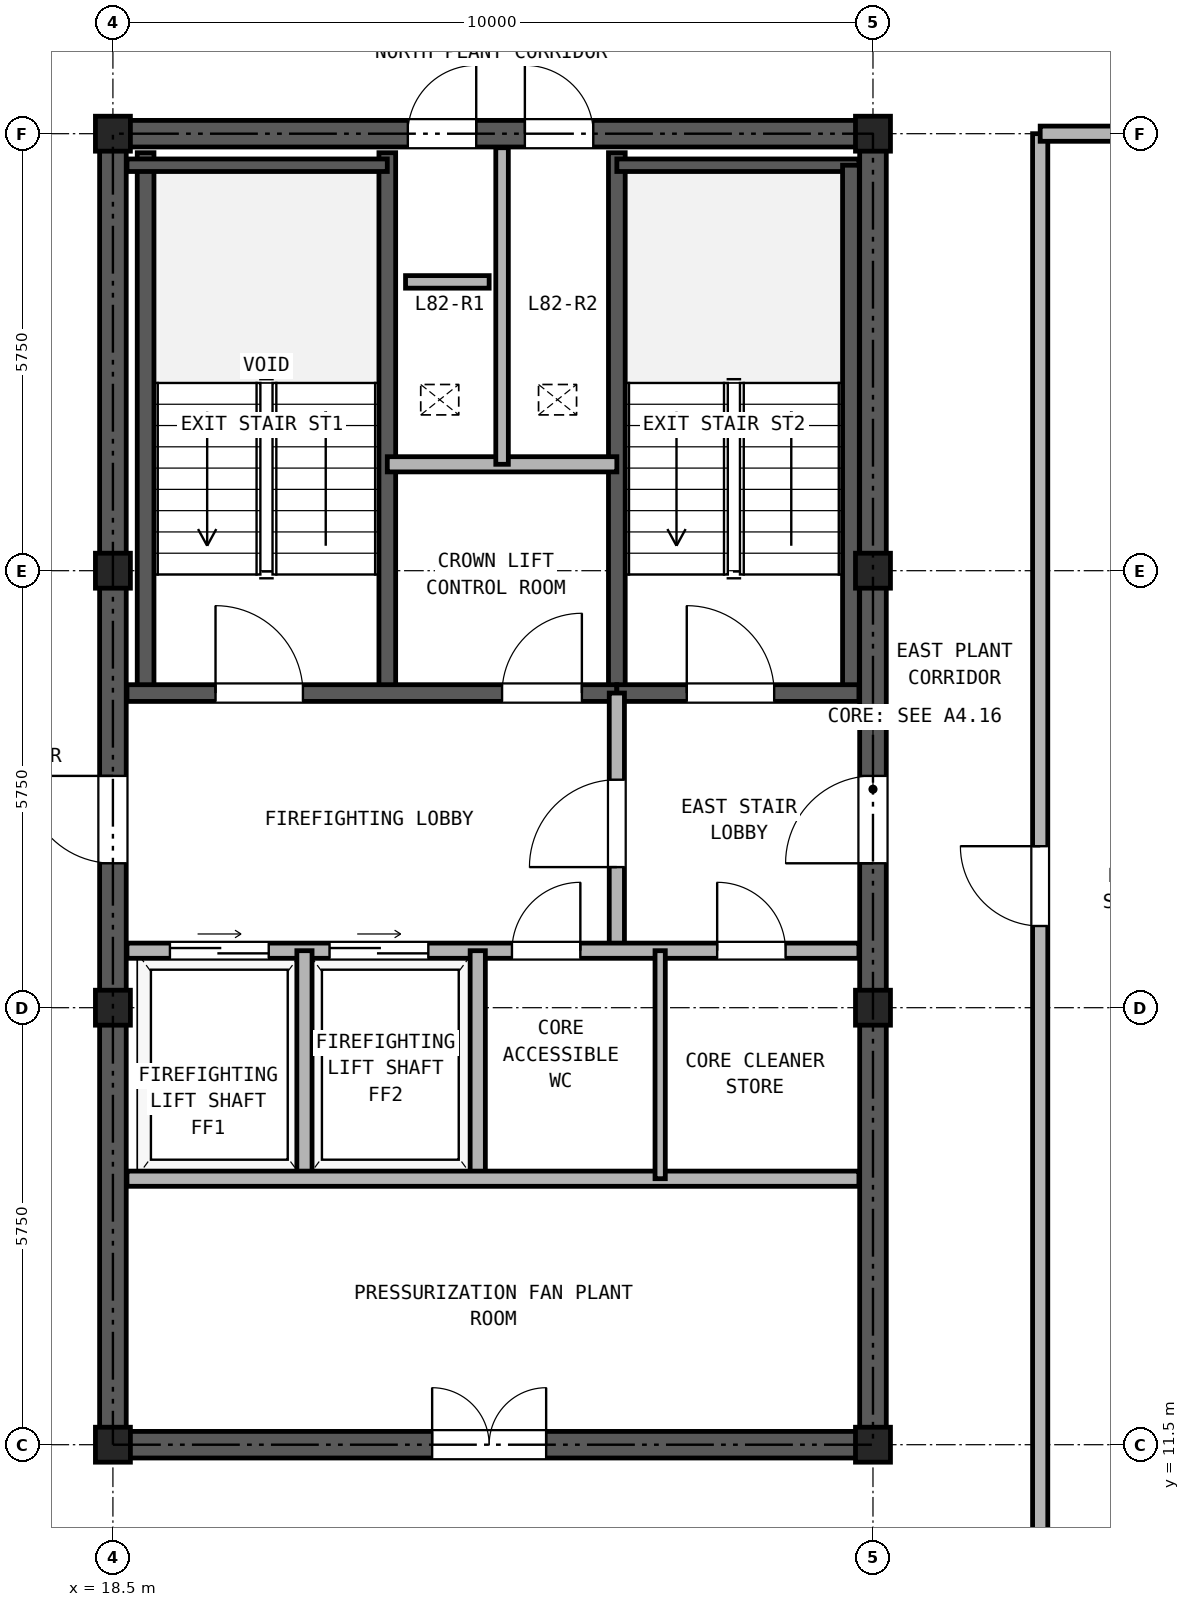
"""IFC4 building model, lengths in metres.
Left out: names, types, materials, properties, quantities, classifications, styles, units other than length and angle.
Written with IfcOpenShell. Run it as: python <this file> out.ifc"""

import sys

from ifc_helpers import new_model, si_unit, direction, frame, frame_2d, origin, origin_2d, place, context, subcontext, project, spatial, rectangle, hollow_rectangle, extrude, source, transform, mapped, element, fill, save


model = new_model("IFC4")
c1 = context("Model", 3, precision=1e-05, world=origin(), true_north=direction((0.0, 1.0)))
c2 = subcontext(c1, "Body", "Model", "MODEL_VIEW")
j1 = project(units=[si_unit("LENGTHUNIT", "METRE"), si_unit("PLANEANGLEUNIT", "RADIAN")], contexts=[c1])
p1 = place(None, origin())
s1 = spatial("IfcSite", under=j1, at=p1, CompositionType="ELEMENT")
p2 = place(p1, origin())
s2 = spatial("IfcBuilding", under=s1, at=p2, CompositionType="ELEMENT")
p3 = place(p2, frame((0.0, 0.0, 285.7)))
s3 = spatial("IfcBuildingStorey", under=s2, at=p3, CompositionType="ELEMENT", Elevation=285.7)
m1 = source(origin(), c2, "Body", "SweptSolid", [
    extrude(hollow_rectangle(XDim=0.46, YDim=0.46, WallThickness=0.025, at=origin_2d()), origin(), (0.0, 0.0, 1.0), 3.38),
])
for number, where, z_axis, x_axis in (
    (1, (18.5, 11.5, 0.0), (0.0, 0.0, 1.0), (1.0, 0.0, 0.0)),
    (2, (18.5, 17.25, 0.0), (0.0, 0.0, 1.0), (1.0, 0.0, 0.0)),
    (3, (18.5, 23.0, 0.0), (0.0, 0.0, 1.0), (1.0, 0.0, 0.0)),
    (4, (18.5, 28.75, 0.0), (0.0, 0.0, 1.0), (1.0, 0.0, 0.0)),
    (5, (28.5, 11.5, 0.0), (0.0, 0.0, 1.0), (1.0, 0.0, 0.0)),
    (6, (28.5, 17.25, 0.0), (0.0, 0.0, 1.0), (1.0, 0.0, 0.0)),
    (7, (28.5, 23.0, 0.0), (0.0, 0.0, 1.0), (1.0, 0.0, 0.0)),
    (8, (28.5, 28.75, 0.0), (0.0, 0.0, 1.0), (1.0, 0.0, 0.0)),
):
    element("IfcColumn", number, at=place(p3, frame(where, z_axis=z_axis, x_axis=x_axis)), inside=s3, PredefinedType="COLUMN", context=c2, shape_type="MappedRepresentation", body=[
        mapped(m1, transform((0.0, 0.0, 0.0), x_axis=(1.0, 0.0, 0.0), y_axis=(0.0, 1.0, 0.0), z_axis=(0.0, 0.0, 1.0), scale=1.0)),
    ])
p4 = place(p3, frame((18.325, 11.5, 0.0), z_axis=(0.0, 0.0, 1.0), x_axis=(1.0, 0.0, 0.0)))
e9 = element("IfcWall", 9, at=p4, inside=s3, PredefinedType="SHEAR", context=c2, shape_type="SweptSolid", body=[
    extrude(rectangle(XDim=10.35, YDim=0.35, at=frame_2d((5.175, 0.0))), origin(), (0.0, 0.0, 1.0), 3.38),
])
p5 = place(p4, frame((4.375, 0.0, 0.0)))
e10 = element("IfcOpeningElement", 10, at=p5, cuts=e9, PredefinedType="OPENING", context=c2, shape_type="SweptSolid", body=[
    extrude(rectangle(XDim=1.5, YDim=2.25, at=frame_2d((0.75, 1.125))), frame((0.0, 0.185, 0.0), z_axis=(0.0, -1.0, 0.0), x_axis=(1.0, 0.0, 0.0)), (0.0, 0.0, 1.0), 0.37),
])
p6 = place(p3, frame((18.325, 28.75, 0.0), z_axis=(0.0, 0.0, 1.0), x_axis=(1.0, 0.0, 0.0)))
e11 = element("IfcWall", 11, at=p6, inside=s3, PredefinedType="SHEAR", context=c2, shape_type="SweptSolid", body=[
    extrude(rectangle(XDim=10.35, YDim=0.35, at=frame_2d((5.175, 0.0))), origin(), (0.0, 0.0, 1.0), 3.38),
])
p7 = place(p6, frame((4.055, 0.0, 0.0)))
e12 = element("IfcOpeningElement", 12, at=p7, cuts=e11, PredefinedType="OPENING", context=c2, shape_type="SweptSolid", body=[
    extrude(rectangle(XDim=0.9, YDim=2.05, at=frame_2d((0.45, 1.025))), frame((0.0, 0.185, 0.0), z_axis=(0.0, -1.0, 0.0), x_axis=(1.0, 0.0, 0.0)), (0.0, 0.0, 1.0), 0.37),
])
p8 = place(p6, frame((5.595, 0.0, 0.0)))
e13 = element("IfcOpeningElement", 13, at=p8, cuts=e11, PredefinedType="OPENING", context=c2, shape_type="SweptSolid", body=[
    extrude(rectangle(XDim=0.9, YDim=2.05, at=frame_2d((0.45, 1.025))), frame((0.0, 0.185, 0.0), z_axis=(0.0, -1.0, 0.0), x_axis=(1.0, 0.0, 0.0)), (0.0, 0.0, 1.0), 0.37),
])
p9 = place(p3, frame((18.5, 11.675, 0.0), z_axis=(0.0, 0.0, 1.0), x_axis=(0.0, 1.0, 0.0)))
e14 = element("IfcWall", 14, at=p9, inside=s3, PredefinedType="SHEAR", context=c2, shape_type="SweptSolid", body=[
    extrude(rectangle(XDim=16.9, YDim=0.35, at=frame_2d((8.45, 0.0))), origin(), (0.0, 0.0, 1.0), 3.38),
])
p10 = place(p9, frame((7.475, 0.0, 0.0)))
e15 = element("IfcOpeningElement", 15, at=p10, cuts=e14, PredefinedType="OPENING", context=c2, shape_type="SweptSolid", body=[
    extrude(rectangle(XDim=1.15, YDim=2.2, at=frame_2d((0.575, 1.1))), frame((0.0, 0.185, 0.0), z_axis=(0.0, -1.0, 0.0), x_axis=(1.0, 0.0, 0.0)), (0.0, 0.0, 1.0), 0.37),
])
p11 = place(p3, frame((28.5, 11.675, 0.0), z_axis=(0.0, 0.0, 1.0), x_axis=(0.0, 1.0, 0.0)))
e16 = element("IfcWall", 16, at=p11, inside=s3, PredefinedType="SHEAR", context=c2, shape_type="SweptSolid", body=[
    extrude(rectangle(XDim=16.9, YDim=0.35, at=frame_2d((8.45, 0.0))), origin(), (0.0, 0.0, 1.0), 3.38),
])
p12 = place(p11, frame((7.475, 0.0, 0.0)))
e17 = element("IfcOpeningElement", 17, at=p12, cuts=e16, PredefinedType="OPENING", context=c2, shape_type="SweptSolid", body=[
    extrude(rectangle(XDim=1.15, YDim=2.2, at=frame_2d((0.575, 1.1))), frame((0.0, 0.185, 0.0), z_axis=(0.0, -1.0, 0.0), x_axis=(1.0, 0.0, 0.0)), (0.0, 0.0, 1.0), 0.37),
])
for number, where, z_axis, x_axis in (
    (18, (18.93, 21.39, 0.0), (0.0, 0.0, 1.0), (0.0, 1.0, 0.0)),
    (19, (22.11, 21.39, 0.0), (0.0, 0.0, 1.0), (0.0, 1.0, 0.0)),
    (20, (25.13, 21.39, 0.0), (0.0, 0.0, 1.0), (0.0, 1.0, 0.0)),
):
    element("IfcWall", number, at=place(p3, frame(where, z_axis=z_axis, x_axis=x_axis)), inside=s3, PredefinedType="SOLIDWALL", context=c2, shape_type="SweptSolid", body=[
        extrude(rectangle(XDim=7.11, YDim=0.22, at=frame_2d((3.555, 0.0))), origin(), (0.0, 0.0, 1.0), 3.38),
    ])
p13 = place(p3, frame((18.685, 28.335, 0.0), z_axis=(0.0, 0.0, 1.0), x_axis=(1.0, 0.0, 0.0)))
e21 = element("IfcWall", 21, at=p13, inside=s3, PredefinedType="PARTITIONING", context=c2, shape_type="SweptSolid", body=[
    extrude(rectangle(XDim=3.425, YDim=0.165, at=frame_2d((1.712, 0.0))), origin(), (0.0, 0.0, 1.0), 3.38),
])
p14 = place(p3, frame((25.13, 28.335, 0.0), z_axis=(0.0, 0.0, 1.0), x_axis=(1.0, 0.0, 0.0)))
e22 = element("IfcWall", 22, at=p14, inside=s3, PredefinedType="PARTITIONING", context=c2, shape_type="SweptSolid", body=[
    extrude(rectangle(XDim=3.185, YDim=0.165, at=frame_2d((1.593, 0.0))), origin(), (0.0, 0.0, 1.0), 3.38),
])
p15 = place(p3, frame((28.21, 21.39, 0.0), z_axis=(0.0, 0.0, 1.0), x_axis=(0.0, 1.0, 0.0)))
e23 = element("IfcWall", 23, at=p15, inside=s3, PredefinedType="SOLIDWALL", context=c2, shape_type="SweptSolid", body=[
    extrude(rectangle(XDim=6.945, YDim=0.22, at=frame_2d((3.473, 0.0))), origin(), (0.0, 0.0, 1.0), 3.38),
])
p16 = place(p3, frame((18.685, 21.39, 0.0), z_axis=(0.0, 0.0, 1.0), x_axis=(1.0, 0.0, 0.0)))
e24 = element("IfcWall", 24, at=p16, inside=s3, PredefinedType="SOLIDWALL", context=c2, shape_type="SweptSolid", body=[
    extrude(rectangle(XDim=6.445, YDim=0.22, at=frame_2d((3.222, 0.0))), origin(), (0.0, 0.0, 1.0), 3.38),
])
p17 = place(p16, frame((1.165, 0.0, 0.0)))
e25 = element("IfcOpeningElement", 25, at=p17, cuts=e24, PredefinedType="OPENING", context=c2, shape_type="SweptSolid", body=[
    extrude(rectangle(XDim=1.15, YDim=2.2, at=frame_2d((0.575, 1.1))), frame((0.0, 0.12, 0.0), z_axis=(0.0, -1.0, 0.0), x_axis=(1.0, 0.0, 0.0)), (0.0, 0.0, 1.0), 0.24),
])
p18 = place(p16, frame((4.935, 0.0, 0.0)))
e26 = element("IfcOpeningElement", 26, at=p18, cuts=e24, PredefinedType="OPENING", context=c2, shape_type="SweptSolid", body=[
    extrude(rectangle(XDim=1.05, YDim=2.15, at=frame_2d((0.525, 1.075))), frame((0.0, 0.12, 0.0), z_axis=(0.0, -1.0, 0.0), x_axis=(1.0, 0.0, 0.0)), (0.0, 0.0, 1.0), 0.24),
])
p19 = place(p3, frame((25.13, 21.39, 0.0), z_axis=(0.0, 0.0, 1.0), x_axis=(1.0, 0.0, 0.0)))
e27 = element("IfcWall", 27, at=p19, inside=s3, PredefinedType="SOLIDWALL", context=c2, shape_type="SweptSolid", body=[
    extrude(rectangle(XDim=3.185, YDim=0.22, at=frame_2d((1.593, 0.0))), origin(), (0.0, 0.0, 1.0), 3.38),
])
p20 = place(p19, frame((0.92, 0.0, 0.0)))
e28 = element("IfcOpeningElement", 28, at=p20, cuts=e27, PredefinedType="OPENING", context=c2, shape_type="SweptSolid", body=[
    extrude(rectangle(XDim=1.15, YDim=2.2, at=frame_2d((0.575, 1.1))), frame((0.0, 0.12, 0.0), z_axis=(0.0, -1.0, 0.0), x_axis=(1.0, 0.0, 0.0)), (0.0, 0.0, 1.0), 0.24),
])
p21 = place(p3, frame((22.11, 24.4, 0.0), z_axis=(0.0, 0.0, 1.0), x_axis=(1.0, 0.0, 0.0)))
e29 = element("IfcWall", 29, at=p21, inside=s3, PredefinedType="PARTITIONING", context=c2, shape_type="SweptSolid", body=[
    extrude(rectangle(XDim=3.02, YDim=0.2, at=frame_2d((1.51, 0.0))), origin(), (0.0, 0.0, 1.0), 3.38),
])
p22 = place(p3, frame((23.62, 24.4, 0.0), z_axis=(0.0, 0.0, 1.0), x_axis=(0.0, 1.0, 0.0)))
e30 = element("IfcWall", 30, at=p22, inside=s3, PredefinedType="PARTITIONING", context=c2, shape_type="SweptSolid", body=[
    extrude(rectangle(XDim=4.165, YDim=0.165, at=frame_2d((2.083, 0.0))), origin(), (0.0, 0.0, 1.0), 3.38),
])
p23 = place(p3, frame((25.13, 18.0, 0.0), z_axis=(0.0, 0.0, 1.0), x_axis=(0.0, 1.0, 0.0)))
e31 = element("IfcWall", 31, at=p23, inside=s3, PredefinedType="PARTITIONING", context=c2, shape_type="SweptSolid", body=[
    extrude(rectangle(XDim=3.39, YDim=0.2, at=frame_2d((1.695, 0.0))), origin(), (0.0, 0.0, 1.0), 3.38),
])
p24 = place(p23, frame((1.1, 0.0, 0.0)))
e32 = element("IfcOpeningElement", 32, at=p24, cuts=e31, PredefinedType="OPENING", context=c2, shape_type="SweptSolid", body=[
    extrude(rectangle(XDim=1.15, YDim=2.2, at=frame_2d((0.575, 1.1))), frame((0.0, 0.11, 0.0), z_axis=(0.0, -1.0, 0.0), x_axis=(1.0, 0.0, 0.0)), (0.0, 0.0, 1.0), 0.22),
])
p25 = place(p3, frame((18.685, 18.0, 0.0), z_axis=(0.0, 0.0, 1.0), x_axis=(1.0, 0.0, 0.0)))
e33 = element("IfcWall", 33, at=p25, inside=s3, PredefinedType="PARTITIONING", context=c2, shape_type="SweptSolid", body=[
    extrude(rectangle(XDim=9.63, YDim=0.2, at=frame_2d((4.815, 0.0))), origin(), (0.0, 0.0, 1.0), 3.38),
])
p26 = place(p25, frame((0.565, 0.0, 0.0)))
e34 = element("IfcOpeningElement", 34, at=p26, cuts=e33, PredefinedType="OPENING", context=c2, shape_type="SweptSolid", body=[
    extrude(rectangle(XDim=1.3, YDim=2.3, at=frame_2d((0.65, 1.15))), frame((0.0, 0.11, 0.0), z_axis=(0.0, -1.0, 0.0), x_axis=(1.0, 0.0, 0.0)), (0.0, 0.0, 1.0), 0.22),
])
p27 = place(p25, frame((2.665, 0.0, 0.0)))
e35 = element("IfcOpeningElement", 35, at=p27, cuts=e33, PredefinedType="OPENING", context=c2, shape_type="SweptSolid", body=[
    extrude(rectangle(XDim=1.3, YDim=2.3, at=frame_2d((0.65, 1.15))), frame((0.0, 0.11, 0.0), z_axis=(0.0, -1.0, 0.0), x_axis=(1.0, 0.0, 0.0)), (0.0, 0.0, 1.0), 0.22),
])
p28 = place(p25, frame((5.065, 0.0, 0.0)))
e36 = element("IfcOpeningElement", 36, at=p28, cuts=e33, PredefinedType="OPENING", context=c2, shape_type="SweptSolid", body=[
    extrude(rectangle(XDim=0.9, YDim=2.05, at=frame_2d((0.45, 1.025))), frame((0.0, 0.11, 0.0), z_axis=(0.0, -1.0, 0.0), x_axis=(1.0, 0.0, 0.0)), (0.0, 0.0, 1.0), 0.22),
])
p29 = place(p25, frame((7.765, 0.0, 0.0)))
e37 = element("IfcOpeningElement", 37, at=p29, cuts=e33, PredefinedType="OPENING", context=c2, shape_type="SweptSolid", body=[
    extrude(rectangle(XDim=0.9, YDim=2.05, at=frame_2d((0.45, 1.025))), frame((0.0, 0.11, 0.0), z_axis=(0.0, -1.0, 0.0), x_axis=(1.0, 0.0, 0.0)), (0.0, 0.0, 1.0), 0.22),
])
for number, where, z_axis, x_axis in (
    (38, (21.02, 15.0, 0.0), (0.0, 0.0, 1.0), (0.0, 1.0, 0.0)),
    (39, (23.3, 15.0, 0.0), (0.0, 0.0, 1.0), (0.0, 1.0, 0.0)),
):
    element("IfcWall", number, at=place(p3, frame(where, z_axis=z_axis, x_axis=x_axis)), inside=s3, PredefinedType="PARTITIONING", context=c2, shape_type="SweptSolid", body=[
        extrude(rectangle(XDim=3.0, YDim=0.2, at=frame_2d((1.5, 0.0))), origin(), (0.0, 0.0, 1.0), 3.38),
    ])
p30 = place(p3, frame((18.685, 15.0, 0.0), z_axis=(0.0, 0.0, 1.0), x_axis=(1.0, 0.0, 0.0)))
e40 = element("IfcWall", 40, at=p30, inside=s3, PredefinedType="PARTITIONING", context=c2, shape_type="SweptSolid", body=[
    extrude(rectangle(XDim=9.63, YDim=0.2, at=frame_2d((4.815, 0.0))), origin(), (0.0, 0.0, 1.0), 3.38),
])
p31 = place(p3, frame((25.7, 15.0, 0.0), z_axis=(0.0, 0.0, 1.0), x_axis=(0.0, 1.0, 0.0)))
e41 = element("IfcWall", 41, at=p31, inside=s3, PredefinedType="PARTITIONING", context=c2, shape_type="SweptSolid", body=[
    extrude(rectangle(XDim=3.0, YDim=0.135, at=frame_2d((1.5, 0.0))), origin(), (0.0, 0.0, 1.0), 3.38),
])
p32 = place(p3, frame((30.7, 8.9, 0.0), z_axis=(0.0, 0.0, 1.0), x_axis=(0.0, 1.0, 0.0)))
e42 = element("IfcWall", 42, at=p32, inside=s3, PredefinedType="PARTITIONING", context=c2, shape_type="SweptSolid", body=[
    extrude(rectangle(XDim=19.85, YDim=0.2, at=frame_2d((9.925, 0.0))), origin(), (0.0, 0.0, 1.0), 3.38),
])
p33 = place(p32, frame((9.425, 0.0, 0.0)))
e43 = element("IfcOpeningElement", 43, at=p33, cuts=e42, PredefinedType="OPENING", context=c2, shape_type="SweptSolid", body=[
    extrude(rectangle(XDim=1.05, YDim=2.15, at=frame_2d((0.525, 1.075))), frame((0.0, 0.11, 0.0), z_axis=(0.0, -1.0, 0.0), x_axis=(1.0, 0.0, 0.0)), (0.0, 0.0, 1.0), 0.22),
])
p34 = place(p3, frame((30.7, 28.75, 0.0), z_axis=(0.0, 0.0, 1.0), x_axis=(1.0, 0.0, 0.0)))
e44 = element("IfcWall", 44, at=p34, inside=s3, PredefinedType="PARTITIONING", context=c2, shape_type="SweptSolid", body=[
    extrude(rectangle(XDim=3.85, YDim=0.2, at=frame_2d((1.925, 0.0))), origin(), (0.0, 0.0, 1.0), 2.905),
])
p35 = place(p3, frame((22.35, 26.8, 0.0), z_axis=(0.0, 0.0, 1.0), x_axis=(1.0, 0.0, 0.0)))
e45 = element("IfcWall", 45, at=p35, inside=s3, PredefinedType="PARTITIONING", context=c2, shape_type="SweptSolid", body=[
    extrude(rectangle(XDim=1.1, YDim=0.165, at=frame_2d((0.55, 0.0))), origin(), (0.0, 0.0, 1.0), 3.38),
])
p36 = place(p17, frame((1.15, 0.0, 0.0), z_axis=(0.0, 0.0, 1.0), x_axis=(-1.0, 0.0, 0.0)))
e46 = element("IfcDoor", 46, at=p36, inside=s3, OperationType="SINGLE_SWING_LEFT", PredefinedType="DOOR", context=c2, shape_type="SweptSolid", body=[
    extrude(rectangle(XDim=1.15, YDim=2.2, at=frame_2d((0.575, 1.1))), frame((0.0, 0.025, 0.0), z_axis=(0.0, -1.0, 0.0), x_axis=(1.0, 0.0, 0.0)), (0.0, 0.0, 1.0), 0.05),
])
fill(e25, e46)
p37 = place(p20, frame((1.15, 0.0, 0.0), z_axis=(0.0, 0.0, 1.0), x_axis=(-1.0, 0.0, 0.0)))
e47 = element("IfcDoor", 47, at=p37, inside=s3, OperationType="SINGLE_SWING_LEFT", PredefinedType="DOOR", context=c2, shape_type="SweptSolid", body=[
    extrude(rectangle(XDim=1.15, YDim=2.2, at=frame_2d((0.575, 1.1))), frame((0.0, 0.025, 0.0), z_axis=(0.0, -1.0, 0.0), x_axis=(1.0, 0.0, 0.0)), (0.0, 0.0, 1.0), 0.05),
])
fill(e28, e47)
p38 = place(p18, origin())
e48 = element("IfcDoor", 48, at=p38, inside=s3, OperationType="SINGLE_SWING_RIGHT", PredefinedType="DOOR", context=c2, shape_type="SweptSolid", body=[
    extrude(rectangle(XDim=1.05, YDim=2.15, at=frame_2d((0.525, 1.075))), frame((0.0, 0.025, 0.0), z_axis=(0.0, -1.0, 0.0), x_axis=(1.0, 0.0, 0.0)), (0.0, 0.0, 1.0), 0.05),
])
fill(e26, e48)
p39 = place(p24, origin())
e49 = element("IfcDoor", 49, at=p39, inside=s3, OperationType="SINGLE_SWING_LEFT", PredefinedType="DOOR", context=c2, shape_type="SweptSolid", body=[
    extrude(rectangle(XDim=1.15, YDim=2.2, at=frame_2d((0.575, 1.1))), frame((0.0, 0.025, 0.0), z_axis=(0.0, -1.0, 0.0), x_axis=(1.0, 0.0, 0.0)), (0.0, 0.0, 1.0), 0.05),
])
fill(e32, e49)
p40 = place(p26, origin())
e50 = element("IfcDoor", 50, at=p40, inside=s3, OperationType="DOUBLE_DOOR_SLIDING", PredefinedType="DOOR", context=c2, shape_type="SweptSolid", body=[
    extrude(rectangle(XDim=1.3, YDim=2.3, at=frame_2d((0.65, 1.15))), frame((0.0, 0.025, 0.0), z_axis=(0.0, -1.0, 0.0), x_axis=(1.0, 0.0, 0.0)), (0.0, 0.0, 1.0), 0.05),
])
fill(e34, e50)
p41 = place(p27, origin())
e51 = element("IfcDoor", 51, at=p41, inside=s3, OperationType="DOUBLE_DOOR_SLIDING", PredefinedType="DOOR", context=c2, shape_type="SweptSolid", body=[
    extrude(rectangle(XDim=1.3, YDim=2.3, at=frame_2d((0.65, 1.15))), frame((0.0, 0.025, 0.0), z_axis=(0.0, -1.0, 0.0), x_axis=(1.0, 0.0, 0.0)), (0.0, 0.0, 1.0), 0.05),
])
fill(e35, e51)
p42 = place(p28, frame((0.9, 0.0, 0.0), z_axis=(0.0, 0.0, 1.0), x_axis=(-1.0, 0.0, 0.0)))
e52 = element("IfcDoor", 52, at=p42, inside=s3, OperationType="SINGLE_SWING_RIGHT", PredefinedType="DOOR", context=c2, shape_type="SweptSolid", body=[
    extrude(rectangle(XDim=0.9, YDim=2.05, at=frame_2d((0.45, 1.025))), frame((0.0, 0.025, 0.0), z_axis=(0.0, -1.0, 0.0), x_axis=(1.0, 0.0, 0.0)), (0.0, 0.0, 1.0), 0.05),
])
fill(e36, e52)
p43 = place(p29, frame((0.9, 0.0, 0.0), z_axis=(0.0, 0.0, 1.0), x_axis=(-1.0, 0.0, 0.0)))
e53 = element("IfcDoor", 53, at=p43, inside=s3, OperationType="SINGLE_SWING_LEFT", PredefinedType="DOOR", context=c2, shape_type="SweptSolid", body=[
    extrude(rectangle(XDim=0.9, YDim=2.05, at=frame_2d((0.45, 1.025))), frame((0.0, 0.025, 0.0), z_axis=(0.0, -1.0, 0.0), x_axis=(1.0, 0.0, 0.0)), (0.0, 0.0, 1.0), 0.05),
])
fill(e37, e53)
p44 = place(p10, frame((1.15, 0.0, 0.0), z_axis=(0.0, 0.0, 1.0), x_axis=(-1.0, 0.0, 0.0)))
e54 = element("IfcDoor", 54, at=p44, inside=s3, OperationType="SINGLE_SWING_RIGHT", PredefinedType="DOOR", context=c2, shape_type="SweptSolid", body=[
    extrude(rectangle(XDim=1.15, YDim=2.2, at=frame_2d((0.575, 1.1))), frame((0.0, 0.025, 0.0), z_axis=(0.0, -1.0, 0.0), x_axis=(1.0, 0.0, 0.0)), (0.0, 0.0, 1.0), 0.05),
])
fill(e15, e54)
p45 = place(p12, origin())
e55 = element("IfcDoor", 55, at=p45, inside=s3, OperationType="SINGLE_SWING_LEFT", PredefinedType="DOOR", context=c2, shape_type="SweptSolid", body=[
    extrude(rectangle(XDim=1.15, YDim=2.2, at=frame_2d((0.575, 1.1))), frame((0.0, 0.025, 0.0), z_axis=(0.0, -1.0, 0.0), x_axis=(1.0, 0.0, 0.0)), (0.0, 0.0, 1.0), 0.05),
])
fill(e17, e55)
p46 = place(p7, origin())
e56 = element("IfcDoor", 56, at=p46, inside=s3, OperationType="SINGLE_SWING_RIGHT", PredefinedType="DOOR", context=c2, shape_type="SweptSolid", body=[
    extrude(rectangle(XDim=0.9, YDim=2.05, at=frame_2d((0.45, 1.025))), frame((0.0, 0.025, 0.0), z_axis=(0.0, -1.0, 0.0), x_axis=(1.0, 0.0, 0.0)), (0.0, 0.0, 1.0), 0.05),
])
fill(e12, e56)
p47 = place(p8, origin())
e57 = element("IfcDoor", 57, at=p47, inside=s3, OperationType="SINGLE_SWING_LEFT", PredefinedType="DOOR", context=c2, shape_type="SweptSolid", body=[
    extrude(rectangle(XDim=0.9, YDim=2.05, at=frame_2d((0.45, 1.025))), frame((0.0, 0.025, 0.0), z_axis=(0.0, -1.0, 0.0), x_axis=(1.0, 0.0, 0.0)), (0.0, 0.0, 1.0), 0.05),
])
fill(e13, e57)
p48 = place(p5, frame((1.5, 0.0, 0.0), z_axis=(0.0, 0.0, 1.0), x_axis=(-1.0, 0.0, 0.0)))
e58 = element("IfcDoor", 58, at=p48, inside=s3, OperationType="DOUBLE_DOOR_SINGLE_SWING", PredefinedType="DOOR", context=c2, shape_type="SweptSolid", body=[
    extrude(rectangle(XDim=1.5, YDim=2.25, at=frame_2d((0.75, 1.125))), frame((0.0, 0.025, 0.0), z_axis=(0.0, -1.0, 0.0), x_axis=(1.0, 0.0, 0.0)), (0.0, 0.0, 1.0), 0.05),
])
fill(e10, e58)
p49 = place(p33, origin())
e59 = element("IfcDoor", 59, at=p49, inside=s3, OperationType="SINGLE_SWING_RIGHT", PredefinedType="DOOR", context=c2, shape_type="SweptSolid", body=[
    extrude(rectangle(XDim=1.05, YDim=2.15, at=frame_2d((0.525, 1.075))), frame((0.0, 0.025, 0.0), z_axis=(0.0, -1.0, 0.0), x_axis=(1.0, 0.0, 0.0)), (0.0, 0.0, 1.0), 0.05),
])
fill(e43, e59)
save(model, sys.argv[1])
